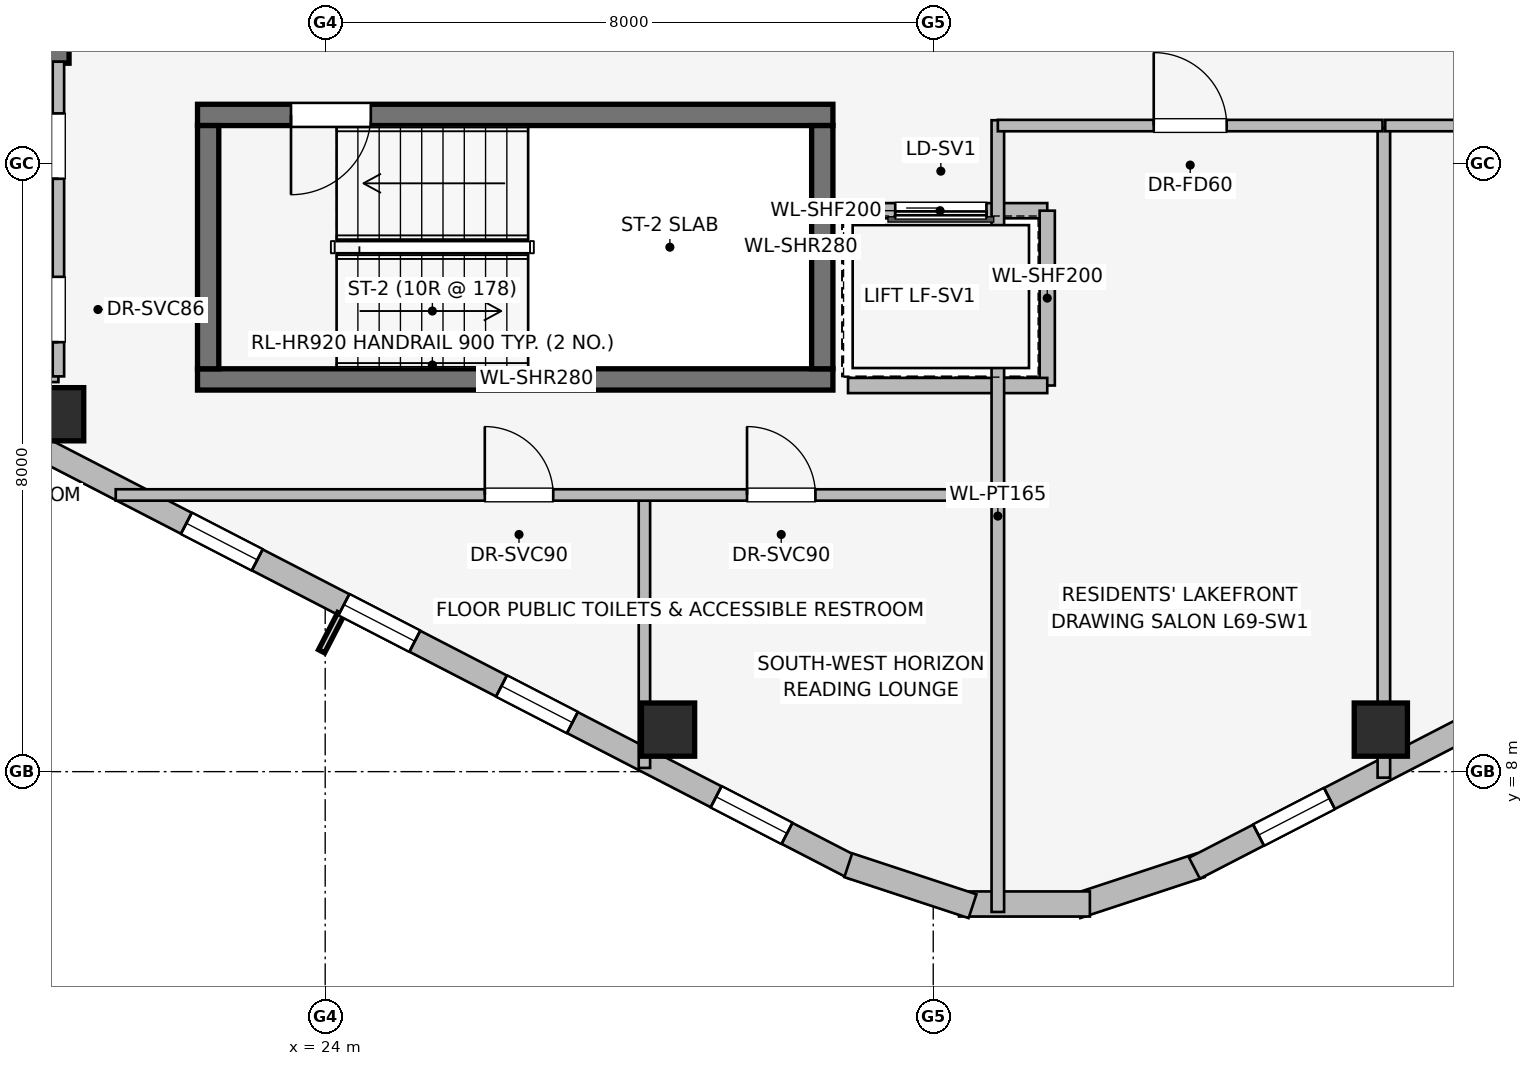
"""IFC4 building model, lengths in metres.
Left out: names, types, materials, properties, quantities, classifications, styles, units other than length and angle.
Written with IfcOpenShell. Run it as: python <this file> out.ifc"""

import sys

from ifc_helpers import new_model, si_unit, direction, frame, frame_2d, origin, origin_2d, place, context, subcontext, project, spatial, rectangle, extrude, element, fill, save


model = new_model("IFC4")
c1 = context("Model", 3, precision=1e-05, world=origin(), true_north=direction((0.0, 1.0)))
c2 = subcontext(c1, "Body", "Model", "MODEL_VIEW")
j1 = project(units=[si_unit("LENGTHUNIT", "METRE"), si_unit("PLANEANGLEUNIT", "RADIAN")], contexts=[c1])
p1 = place(None, origin())
s1 = spatial("IfcSite", under=j1, at=p1, CompositionType="ELEMENT")
p2 = place(p1, origin())
s2 = spatial("IfcBuilding", under=s1, at=p2, CompositionType="ELEMENT")
p3 = place(p2, frame((0.0, 0.0, 252.55)))
s3 = spatial("IfcBuildingStorey", under=s2, at=p3, CompositionType="ELEMENT", Elevation=252.55)
p4 = place(p3, frame((16.87, 17.46, 0.0), z_axis=(0.0, 0.0, 1.0), x_axis=(1.0, 0.0, 0.0)))
e1 = element("IfcWall", 1, at=p4, inside=s3, PredefinedType="SHEAR", context=c2, shape_type="SweptSolid", body=[
    extrude(rectangle(XDim=3.76, YDim=0.28, at=frame_2d((1.88, 0.0))), origin(), (0.0, 0.0, 1.0), 3.55),
])
p5 = place(p3, frame((22.32, 13.16, 0.0), z_axis=(0.0, 0.0, 1.0), x_axis=(1.0, 0.0, 0.0)))
e2 = element("IfcWall", 2, at=p5, inside=s3, PredefinedType="SHEAR", context=c2, shape_type="SweptSolid", body=[
    extrude(rectangle(XDim=8.36, YDim=0.28, at=frame_2d((4.18, 0.0))), origin(), (0.0, 0.0, 1.0), 3.55),
])
p6 = place(p3, frame((30.68, 16.64, 0.0), z_axis=(0.0, 0.0, 1.0), x_axis=(-1.0, 0.0, 0.0)))
e3 = element("IfcWall", 3, at=p6, inside=s3, PredefinedType="SHEAR", context=c2, shape_type="SweptSolid", body=[
    extrude(rectangle(XDim=8.36, YDim=0.28, at=frame_2d((4.18, 0.0))), origin(), (0.0, 0.0, 1.0), 3.55),
])
p7 = place(p6, frame((6.08, 0.0, 0.0)))
e4 = element("IfcOpeningElement", 4, at=p7, cuts=e3, PredefinedType="OPENING", context=c2, shape_type="SweptSolid", body=[
    extrude(rectangle(XDim=1.05, YDim=2.0, at=frame_2d((0.525, 1.0))), frame((0.0, 0.15, 0.0), z_axis=(0.0, -1.0, 0.0), x_axis=(1.0, 0.0, 0.0)), (0.0, 0.0, 1.0), 0.3),
])
for number, where, z_axis, x_axis in (
    (5, (22.46, 16.5, 0.0), (0.0, 0.0, 1.0), (0.0, -1.0, 0.0)),
    (6, (30.54, 13.3, 0.0), (0.0, 0.0, 1.0), (0.0, 1.0, 0.0)),
):
    element("IfcWall", number, at=place(p3, frame(where, z_axis=z_axis, x_axis=x_axis)), inside=s3, PredefinedType="SHEAR", context=c2, shape_type="SweptSolid", body=[
        extrude(rectangle(XDim=3.2, YDim=0.28, at=frame_2d((1.6, 0.0))), origin(), (0.0, 0.0, 1.0), 3.55),
    ])
for number, where, z_axis, x_axis in (
    (7, (20.473, 12.702, 0.0), (0.0, 0.0, 1.0), (1.0, 0.0, 0.0)),
    (8, (28.511, 8.553, 0.0), (0.0, 0.0, 1.0), (1.0, 0.0, 0.0)),
    (9, (37.889, 8.553, 0.0), (0.0, 0.0, 1.0), (1.0, 0.0, 0.0)),
):
    element("IfcColumn", number, at=place(p3, frame(where, z_axis=z_axis, x_axis=x_axis)), inside=s3, PredefinedType="COLUMN", context=c2, shape_type="SweptSolid", body=[
        extrude(rectangle(XDim=0.7, YDim=0.7, at=origin_2d()), origin(), (0.0, 0.0, 1.0), 3.55),
    ])
p8 = place(p3, frame((30.963, 6.73, 0.0), z_axis=(0.0, 0.0, 1.0), x_axis=(-0.888581481622, 0.458718814218, 0.0)))
e10 = element("IfcWall", 10, at=p8, inside=s3, PredefinedType="STANDARD", context=c2, shape_type="SweptSolid", body=[
    extrude(rectangle(XDim=15.077, YDim=0.31, at=frame_2d((7.539, 0.0))), origin(), (0.0, 0.0, 1.0), 3.29),
])
p9 = place(p8, frame((0.998, 0.0, 0.75)))
e11 = element("IfcOpeningElement", 11, at=p9, cuts=e10, PredefinedType="OPENING", context=c2, shape_type="SweptSolid", body=[
    extrude(rectangle(XDim=1.05, YDim=1.4, at=frame_2d((0.525, 0.7))), frame((0.0, 0.165, 0.0), z_axis=(0.0, -1.0, 0.0), x_axis=(1.0, 0.0, 0.0)), (0.0, 0.0, 1.0), 0.33),
])
p10 = place(p8, frame((4.176, 0.0, 0.75)))
e12 = element("IfcOpeningElement", 12, at=p10, cuts=e10, PredefinedType="OPENING", context=c2, shape_type="SweptSolid", body=[
    extrude(rectangle(XDim=1.05, YDim=1.4, at=frame_2d((0.525, 0.7))), frame((0.0, 0.165, 0.0), z_axis=(0.0, -1.0, 0.0), x_axis=(1.0, 0.0, 0.0)), (0.0, 0.0, 1.0), 0.33),
])
p11 = place(p8, frame((6.509, 0.0, 0.75)))
e13 = element("IfcOpeningElement", 13, at=p11, cuts=e10, PredefinedType="OPENING", context=c2, shape_type="SweptSolid", body=[
    extrude(rectangle(XDim=1.05, YDim=1.4, at=frame_2d((0.525, 0.7))), frame((0.0, 0.165, 0.0), z_axis=(0.0, -1.0, 0.0), x_axis=(1.0, 0.0, 0.0)), (0.0, 0.0, 1.0), 0.33),
])
p12 = place(p8, frame((8.842, 0.0, 0.75)))
e14 = element("IfcOpeningElement", 14, at=p12, cuts=e10, PredefinedType="OPENING", context=c2, shape_type="SweptSolid", body=[
    extrude(rectangle(XDim=1.05, YDim=1.4, at=frame_2d((0.525, 0.7))), frame((0.0, 0.165, 0.0), z_axis=(0.0, -1.0, 0.0), x_axis=(1.0, 0.0, 0.0)), (0.0, 0.0, 1.0), 0.33),
])
p13 = place(p3, frame((35.518, 6.769, 0.0), z_axis=(0.0, 0.0, 1.0), x_axis=(-0.949713440491, -0.313120393699, 0.0)))
e15 = element("IfcWall", 15, at=p13, inside=s3, PredefinedType="STANDARD", context=c2, shape_type="SweptSolid", body=[
    extrude(rectangle(XDim=1.722, YDim=0.33, at=frame_2d((0.861, 0.0))), origin(), (0.0, 0.0, 1.0), 3.29),
])
p14 = place(p3, frame((34.061, 6.259, 0.0), z_axis=(0.0, 0.0, 1.0), x_axis=(-1.0, 0.0, 0.0)))
e16 = element("IfcWall", 16, at=p14, inside=s3, PredefinedType="STANDARD", context=c2, shape_type="SweptSolid", body=[
    extrude(rectangle(XDim=1.722, YDim=0.33, at=frame_2d((0.861, 0.0))), origin(), (0.0, 0.0, 1.0), 3.29),
])
p15 = place(p3, frame((32.517, 6.23, 0.0), z_axis=(0.0, 0.0, 1.0), x_axis=(-0.949713440491, 0.313120393699, 0.0)))
e17 = element("IfcWall", 17, at=p15, inside=s3, PredefinedType="STANDARD", context=c2, shape_type="SweptSolid", body=[
    extrude(rectangle(XDim=1.722, YDim=0.33, at=frame_2d((0.861, 0.0))), origin(), (0.0, 0.0, 1.0), 3.29),
])
p16 = place(p3, frame((48.834, 13.646, 0.0), z_axis=(0.0, 0.0, 1.0), x_axis=(-0.888581481622, -0.458718814218, 0.0)))
e18 = element("IfcWall", 18, at=p16, inside=s3, PredefinedType="STANDARD", context=c2, shape_type="SweptSolid", body=[
    extrude(rectangle(XDim=15.077, YDim=0.31, at=frame_2d((7.539, 0.0))), origin(), (0.0, 0.0, 1.0), 3.29),
])
p17 = place(p16, frame((0.998, 0.0, 0.75)))
e19 = element("IfcOpeningElement", 19, at=p17, cuts=e18, PredefinedType="OPENING", context=c2, shape_type="SweptSolid", body=[
    extrude(rectangle(XDim=1.05, YDim=1.4, at=frame_2d((0.525, 0.7))), frame((0.0, 0.165, 0.0), z_axis=(0.0, -1.0, 0.0), x_axis=(1.0, 0.0, 0.0)), (0.0, 0.0, 1.0), 0.33),
])
p18 = place(p16, frame((4.345, 0.0, 0.75)))
e20 = element("IfcOpeningElement", 20, at=p18, cuts=e18, PredefinedType="OPENING", context=c2, shape_type="SweptSolid", body=[
    extrude(rectangle(XDim=1.05, YDim=1.4, at=frame_2d((0.525, 0.7))), frame((0.0, 0.165, 0.0), z_axis=(0.0, -1.0, 0.0), x_axis=(1.0, 0.0, 0.0)), (0.0, 0.0, 1.0), 0.33),
])
p19 = place(p16, frame((7.014, 0.0, 0.75)))
e21 = element("IfcOpeningElement", 21, at=p19, cuts=e18, PredefinedType="OPENING", context=c2, shape_type="SweptSolid", body=[
    extrude(rectangle(XDim=1.05, YDim=1.4, at=frame_2d((0.525, 0.7))), frame((0.0, 0.165, 0.0), z_axis=(0.0, -1.0, 0.0), x_axis=(1.0, 0.0, 0.0)), (0.0, 0.0, 1.0), 0.33),
])
p20 = place(p16, frame((9.683, 0.0, 0.75)))
e22 = element("IfcOpeningElement", 22, at=p20, cuts=e18, PredefinedType="OPENING", context=c2, shape_type="SweptSolid", body=[
    extrude(rectangle(XDim=1.05, YDim=1.4, at=frame_2d((0.525, 0.7))), frame((0.0, 0.165, 0.0), z_axis=(0.0, -1.0, 0.0), x_axis=(1.0, 0.0, 0.0)), (0.0, 0.0, 1.0), 0.33),
])
p21 = place(p16, frame((13.078, 0.0, 0.75)))
e23 = element("IfcOpeningElement", 23, at=p21, cuts=e18, PredefinedType="OPENING", context=c2, shape_type="SweptSolid", body=[
    extrude(rectangle(XDim=1.05, YDim=1.4, at=frame_2d((0.525, 0.7))), frame((0.0, 0.165, 0.0), z_axis=(0.0, -1.0, 0.0), x_axis=(1.0, 0.0, 0.0)), (0.0, 0.0, 1.0), 0.33),
])
p22 = place(p3, frame((33.5, 15.38, 0.0), z_axis=(0.0, 0.0, 1.0), x_axis=(-1.0, 0.0, 0.0)))
e24 = element("IfcWall", 24, at=p22, inside=s3, PredefinedType="PARTITIONING", context=c2, shape_type="SweptSolid", body=[
    extrude(rectangle(XDim=2.82, YDim=0.2, at=frame_2d((1.41, 0.0))), origin(), (0.0, 0.0, 1.0), 3.29),
])
p23 = place(p22, frame((0.8, 0.0, 0.0)))
e25 = element("IfcOpeningElement", 25, at=p23, cuts=e24, PredefinedType="OPENING", context=c2, shape_type="SweptSolid", body=[
    extrude(rectangle(XDim=1.2, YDim=2.2, at=frame_2d((0.6, 1.1))), frame((0.0, 0.11, 0.0), z_axis=(0.0, -1.0, 0.0), x_axis=(1.0, 0.0, 0.0)), (0.0, 0.0, 1.0), 0.22),
])
p24 = place(p3, frame((33.5, 13.08, 0.0), z_axis=(0.0, 0.0, 1.0), x_axis=(0.0, 1.0, 0.0)))
e26 = element("IfcWall", 26, at=p24, inside=s3, PredefinedType="PARTITIONING", context=c2, shape_type="SweptSolid", body=[
    extrude(rectangle(XDim=2.3, YDim=0.2, at=frame_2d((1.15, 0.0))), origin(), (0.0, 0.0, 1.0), 3.29),
])
p25 = place(p3, frame((30.879, 13.08, 0.0), z_axis=(0.0, 0.0, 1.0), x_axis=(1.0, 0.0, 0.0)))
e27 = element("IfcWall", 27, at=p25, inside=s3, PredefinedType="PARTITIONING", context=c2, shape_type="SweptSolid", body=[
    extrude(rectangle(XDim=2.621, YDim=0.2, at=frame_2d((1.311, 0.0))), origin(), (0.0, 0.0, 1.0), 3.29),
])
p26 = place(p3, frame((18.113, 13.2, 0.0), z_axis=(0.0, 0.0, 1.0), x_axis=(1.0, 0.0, 0.0)))
e28 = element("IfcWall", 28, at=p26, inside=s3, PredefinedType="PARTITIONING", context=c2, shape_type="SweptSolid", body=[
    extrude(rectangle(XDim=2.377, YDim=0.15, at=frame_2d((1.188, 0.0))), origin(), (0.0, 0.0, 1.0), 3.29),
])
p27 = place(p3, frame((18.1, 15.22, 0.0), z_axis=(0.0, 0.0, 1.0), x_axis=(1.0, 0.0, 0.0)))
e29 = element("IfcWall", 29, at=p27, inside=s3, PredefinedType="PARTITIONING", context=c2, shape_type="SweptSolid", body=[
    extrude(rectangle(XDim=2.39, YDim=0.15, at=frame_2d((1.195, 0.0))), origin(), (0.0, 0.0, 1.0), 3.29),
])
p28 = place(p3, frame((20.49, 13.2, 0.0), z_axis=(0.0, 0.0, 1.0), x_axis=(0.0, 1.0, 0.0)))
e30 = element("IfcWall", 30, at=p28, inside=s3, PredefinedType="PARTITIONING", context=c2, shape_type="SweptSolid", body=[
    extrude(rectangle(XDim=4.14, YDim=0.15, at=frame_2d((2.07, 0.0))), origin(), (0.0, 0.0, 1.0), 3.29),
])
p29 = place(p28, frame((0.45, 0.0, 0.0)))
e31 = element("IfcOpeningElement", 31, at=p29, cuts=e30, PredefinedType="OPENING", context=c2, shape_type="SweptSolid", body=[
    extrude(rectangle(XDim=0.86, YDim=2.0, at=frame_2d((0.43, 1.0))), frame((0.0, 0.085, 0.0), z_axis=(0.0, -1.0, 0.0), x_axis=(1.0, 0.0, 0.0)), (0.0, 0.0, 1.0), 0.17),
])
p30 = place(p28, frame((2.6, 0.0, 0.0)))
e32 = element("IfcOpeningElement", 32, at=p30, cuts=e30, PredefinedType="OPENING", context=c2, shape_type="SweptSolid", body=[
    extrude(rectangle(XDim=0.86, YDim=2.0, at=frame_2d((0.43, 1.0))), frame((0.0, 0.085, 0.0), z_axis=(0.0, -1.0, 0.0), x_axis=(1.0, 0.0, 0.0)), (0.0, 0.0, 1.0), 0.17),
])
p31 = place(p3, frame((32.85, 6.154, 0.0), z_axis=(0.0, 0.0, 1.0), x_axis=(0.0, 1.0, 0.0)))
e33 = element("IfcWall", 33, at=p31, inside=s3, PredefinedType="PARTITIONING", context=c2, shape_type="SweptSolid", body=[
    extrude(rectangle(XDim=10.416, YDim=0.165, at=frame_2d((5.208, 0.0))), origin(), (0.0, 0.0, 1.0), 3.29),
])
p32 = place(p3, frame((28.2, 8.049, 0.0), z_axis=(0.0, 0.0, 1.0), x_axis=(0.0, 1.0, 0.0)))
e34 = element("IfcWall", 34, at=p32, inside=s3, PredefinedType="PARTITIONING", context=c2, shape_type="SweptSolid", body=[
    extrude(rectangle(XDim=3.591, YDim=0.15, at=frame_2d((1.795, 0.0))), origin(), (0.0, 0.0, 1.0), 3.29),
])
p33 = place(p3, frame((21.244, 11.64, 0.0), z_axis=(0.0, 0.0, 1.0), x_axis=(1.0, 0.0, 0.0)))
e35 = element("IfcWall", 35, at=p33, inside=s3, PredefinedType="PARTITIONING", context=c2, shape_type="SweptSolid", body=[
    extrude(rectangle(XDim=11.606, YDim=0.15, at=frame_2d((5.803, 0.0))), origin(), (0.0, 0.0, 1.0), 2.833),
])
p34 = place(p33, frame((4.856, 0.0, 0.0)))
e36 = element("IfcOpeningElement", 36, at=p34, cuts=e35, PredefinedType="OPENING", context=c2, shape_type="SweptSolid", body=[
    extrude(rectangle(XDim=0.9, YDim=2.0, at=frame_2d((0.45, 1.0))), frame((0.0, 0.085, 0.0), z_axis=(0.0, -1.0, 0.0), x_axis=(1.0, 0.0, 0.0)), (0.0, 0.0, 1.0), 0.17),
])
p35 = place(p33, frame((8.306, 0.0, 0.0)))
e37 = element("IfcOpeningElement", 37, at=p35, cuts=e35, PredefinedType="OPENING", context=c2, shape_type="SweptSolid", body=[
    extrude(rectangle(XDim=0.9, YDim=2.0, at=frame_2d((0.45, 1.0))), frame((0.0, 0.085, 0.0), z_axis=(0.0, -1.0, 0.0), x_axis=(1.0, 0.0, 0.0)), (0.0, 0.0, 1.0), 0.17),
])
p36 = place(p3, frame((37.929, 7.921, 0.0), z_axis=(0.0, 0.0, 1.0), x_axis=(0.0, 1.0, 0.0)))
e38 = element("IfcWall", 38, at=p36, inside=s3, PredefinedType="PARTITIONING", context=c2, shape_type="SweptSolid", body=[
    extrude(rectangle(XDim=8.549, YDim=0.165, at=frame_2d((4.274, 0.0))), origin(), (0.0, 0.0, 1.0), 2.679),
])
p37 = place(p3, frame((32.85, 16.5, 0.0), z_axis=(0.0, 0.0, 1.0), x_axis=(1.0, 0.0, 0.0)))
e39 = element("IfcWall", 39, at=p37, inside=s3, PredefinedType="PARTITIONING", context=c2, shape_type="SweptSolid", body=[
    extrude(rectangle(XDim=5.061, YDim=0.15, at=frame_2d((2.53, 0.0))), origin(), (0.0, 0.0, 1.0), 3.29),
])
p38 = place(p37, frame((2.051, 0.0, 0.0)))
e40 = element("IfcOpeningElement", 40, at=p38, cuts=e39, PredefinedType="OPENING", context=c2, shape_type="SweptSolid", body=[
    extrude(rectangle(XDim=0.96, YDim=2.0, at=frame_2d((0.48, 1.0))), frame((0.0, 0.085, 0.0), z_axis=(0.0, -1.0, 0.0), x_axis=(1.0, 0.0, 0.0)), (0.0, 0.0, 1.0), 0.17),
])
p39 = place(p3, frame((37.947, 16.5, 0.0), z_axis=(0.0, 0.0, 1.0), x_axis=(1.0, 0.0, 0.0)))
e41 = element("IfcWall", 41, at=p39, inside=s3, PredefinedType="PARTITIONING", context=c2, shape_type="SweptSolid", body=[
    extrude(rectangle(XDim=3.513, YDim=0.15, at=frame_2d((1.756, 0.0))), origin(), (0.0, 0.0, 1.0), 3.29),
])
p40 = place(p39, frame((1.277, 0.0, 0.0)))
e42 = element("IfcOpeningElement", 42, at=p40, cuts=e41, PredefinedType="OPENING", context=c2, shape_type="SweptSolid", body=[
    extrude(rectangle(XDim=0.96, YDim=2.0, at=frame_2d((0.48, 1.0))), frame((0.0, 0.085, 0.0), z_axis=(0.0, -1.0, 0.0), x_axis=(1.0, 0.0, 0.0)), (0.0, 0.0, 1.0), 0.17),
])
p41 = place(p9, origin())
e43 = element("IfcWindow", 43, at=p41, inside=s3, PartitioningType="SINGLE_PANEL", PredefinedType="WINDOW", context=c2, shape_type="SweptSolid", body=[
    extrude(rectangle(XDim=1.05, YDim=1.4, at=frame_2d((0.525, 0.7))), frame((0.0, 0.03, 0.0), z_axis=(0.0, -1.0, 0.0), x_axis=(1.0, 0.0, 0.0)), (0.0, 0.0, 1.0), 0.06),
])
fill(e11, e43)
p42 = place(p10, origin())
e44 = element("IfcWindow", 44, at=p42, inside=s3, PartitioningType="SINGLE_PANEL", PredefinedType="WINDOW", context=c2, shape_type="SweptSolid", body=[
    extrude(rectangle(XDim=1.05, YDim=1.4, at=frame_2d((0.525, 0.7))), frame((0.0, 0.03, 0.0), z_axis=(0.0, -1.0, 0.0), x_axis=(1.0, 0.0, 0.0)), (0.0, 0.0, 1.0), 0.06),
])
fill(e12, e44)
p43 = place(p11, origin())
e45 = element("IfcWindow", 45, at=p43, inside=s3, PartitioningType="SINGLE_PANEL", PredefinedType="WINDOW", context=c2, shape_type="SweptSolid", body=[
    extrude(rectangle(XDim=1.05, YDim=1.4, at=frame_2d((0.525, 0.7))), frame((0.0, 0.03, 0.0), z_axis=(0.0, -1.0, 0.0), x_axis=(1.0, 0.0, 0.0)), (0.0, 0.0, 1.0), 0.06),
])
fill(e13, e45)
p44 = place(p12, origin())
e46 = element("IfcWindow", 46, at=p44, inside=s3, PartitioningType="SINGLE_PANEL", PredefinedType="WINDOW", context=c2, shape_type="SweptSolid", body=[
    extrude(rectangle(XDim=1.05, YDim=1.4, at=frame_2d((0.525, 0.7))), frame((0.0, 0.03, 0.0), z_axis=(0.0, -1.0, 0.0), x_axis=(1.0, 0.0, 0.0)), (0.0, 0.0, 1.0), 0.06),
])
fill(e14, e46)
p45 = place(p21, origin())
e47 = element("IfcWindow", 47, at=p45, inside=s3, PartitioningType="SINGLE_PANEL", PredefinedType="WINDOW", context=c2, shape_type="SweptSolid", body=[
    extrude(rectangle(XDim=1.05, YDim=1.4, at=frame_2d((0.525, 0.7))), frame((0.0, 0.03, 0.0), z_axis=(0.0, -1.0, 0.0), x_axis=(1.0, 0.0, 0.0)), (0.0, 0.0, 1.0), 0.06),
])
fill(e23, e47)
p46 = place(p7, origin())
e48 = element("IfcDoor", 48, at=p46, inside=s3, OperationType="SINGLE_SWING_RIGHT", PredefinedType="DOOR", context=c2, shape_type="SweptSolid", body=[
    extrude(rectangle(XDim=1.05, YDim=2.0, at=frame_2d((0.525, 1.0))), frame((0.0, 0.025, 0.0), z_axis=(0.0, -1.0, 0.0), x_axis=(1.0, 0.0, 0.0)), (0.0, 0.0, 1.0), 0.05),
])
fill(e4, e48)
p47 = place(p23, origin())
e49 = element("IfcDoor", 49, at=p47, inside=s3, OperationType="SLIDING_TO_RIGHT", PredefinedType="DOOR", context=c2, shape_type="SweptSolid", body=[
    extrude(rectangle(XDim=1.2, YDim=2.2, at=frame_2d((0.6, 1.1))), frame((0.0, 0.025, 0.0), z_axis=(0.0, -1.0, 0.0), x_axis=(1.0, 0.0, 0.0)), (0.0, 0.0, 1.0), 0.05),
])
fill(e25, e49)
p48 = place(p29, origin())
e50 = element("IfcDoor", 50, at=p48, inside=s3, OperationType="SINGLE_SWING_LEFT", PredefinedType="DOOR", context=c2, shape_type="SweptSolid", body=[
    extrude(rectangle(XDim=0.86, YDim=2.0, at=frame_2d((0.43, 1.0))), frame((0.0, 0.025, 0.0), z_axis=(0.0, -1.0, 0.0), x_axis=(1.0, 0.0, 0.0)), (0.0, 0.0, 1.0), 0.05),
])
fill(e31, e50)
p49 = place(p30, origin())
e51 = element("IfcDoor", 51, at=p49, inside=s3, OperationType="SINGLE_SWING_LEFT", PredefinedType="DOOR", context=c2, shape_type="SweptSolid", body=[
    extrude(rectangle(XDim=0.86, YDim=2.0, at=frame_2d((0.43, 1.0))), frame((0.0, 0.025, 0.0), z_axis=(0.0, -1.0, 0.0), x_axis=(1.0, 0.0, 0.0)), (0.0, 0.0, 1.0), 0.05),
])
fill(e32, e51)
p50 = place(p34, origin())
e52 = element("IfcDoor", 52, at=p50, inside=s3, OperationType="SINGLE_SWING_LEFT", PredefinedType="DOOR", context=c2, shape_type="SweptSolid", body=[
    extrude(rectangle(XDim=0.9, YDim=2.0, at=frame_2d((0.45, 1.0))), frame((0.0, 0.025, 0.0), z_axis=(0.0, -1.0, 0.0), x_axis=(1.0, 0.0, 0.0)), (0.0, 0.0, 1.0), 0.05),
])
fill(e36, e52)
p51 = place(p35, origin())
e53 = element("IfcDoor", 53, at=p51, inside=s3, OperationType="SINGLE_SWING_LEFT", PredefinedType="DOOR", context=c2, shape_type="SweptSolid", body=[
    extrude(rectangle(XDim=0.9, YDim=2.0, at=frame_2d((0.45, 1.0))), frame((0.0, 0.025, 0.0), z_axis=(0.0, -1.0, 0.0), x_axis=(1.0, 0.0, 0.0)), (0.0, 0.0, 1.0), 0.05),
])
fill(e37, e53)
p52 = place(p38, origin())
e54 = element("IfcDoor", 54, at=p52, inside=s3, OperationType="SINGLE_SWING_LEFT", PredefinedType="DOOR", context=c2, shape_type="SweptSolid", body=[
    extrude(rectangle(XDim=0.96, YDim=2.0, at=frame_2d((0.48, 1.0))), frame((0.0, 0.025, 0.0), z_axis=(0.0, -1.0, 0.0), x_axis=(1.0, 0.0, 0.0)), (0.0, 0.0, 1.0), 0.05),
])
fill(e40, e54)
save(model, sys.argv[1])
